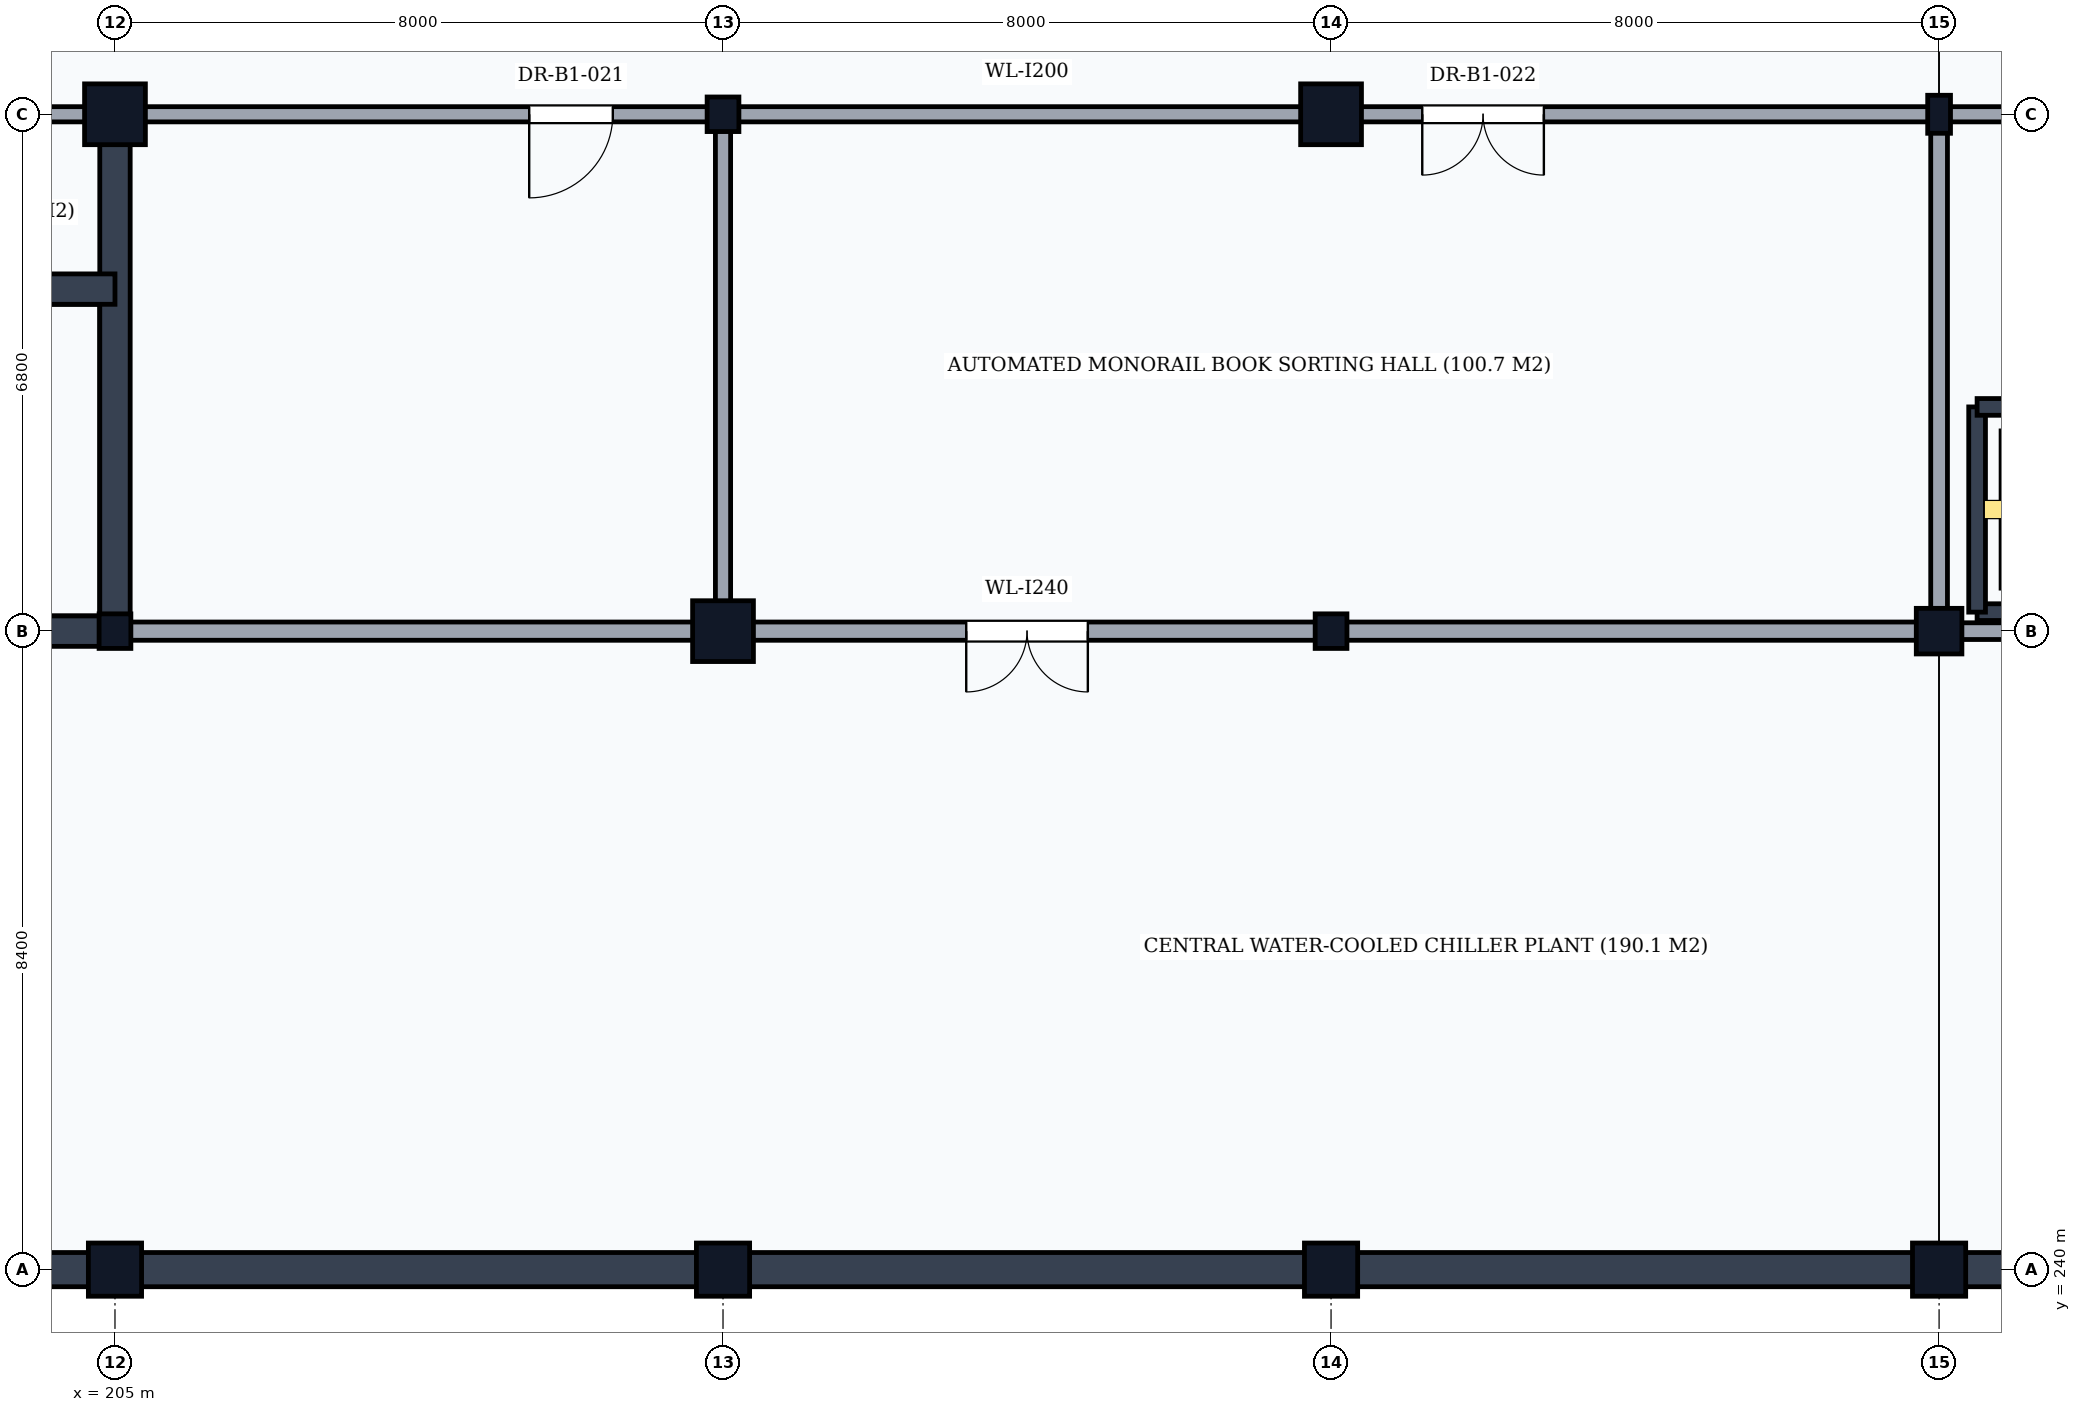
"""IFC4 building model, lengths in metres.
Left out: names, types, materials, properties, quantities, classifications, styles, units other than length and angle.
Written with IfcOpenShell. Run it as: python <this file> out.ifc"""

import sys

from ifc_helpers import new_model, si_unit, direction, frame, frame_2d, origin, origin_2d, place, context, subcontext, project, spatial, rectangle, i_section, extrude, element, fill, save


model = new_model("IFC4")
c1 = context("Model", 3, precision=1e-05, world=origin(), true_north=direction((0.0, 1.0)))
c2 = subcontext(c1, "Body", "Model", "MODEL_VIEW")
j1 = project(units=[si_unit("LENGTHUNIT", "METRE"), si_unit("PLANEANGLEUNIT", "RADIAN")], contexts=[c1])
p1 = place(None, origin())
s1 = spatial("IfcSite", under=j1, at=p1, CompositionType="ELEMENT")
p2 = place(p1, origin())
s2 = spatial("IfcBuilding", under=s1, at=p2, CompositionType="ELEMENT")
p3 = place(p2, frame((0.0, 0.0, -4.8)))
s3 = spatial("IfcBuildingStorey", under=s2, at=p3, CompositionType="ELEMENT", Elevation=-4.8)
p4 = place(p3, frame((205.0, 240.0, 0.0), z_axis=(0.0, 0.0, 1.0), x_axis=(1.0, 0.0, 0.0)))
e1 = element("IfcColumn", 1, at=p4, inside=s3, PredefinedType="COLUMN", context=c2, shape_type="SweptSolid", body=[
    extrude(rectangle(XDim=0.7, YDim=0.7, at=origin_2d()), origin(), (0.0, 0.0, 1.0), 4.8),
])
p5 = place(p3, frame((205.0, 248.4, 0.0), z_axis=(0.0, 0.0, 1.0), x_axis=(1.0, 0.0, 0.0)))
e2 = element("IfcColumn", 2, at=p5, inside=s3, PredefinedType="COLUMN", context=c2, shape_type="SweptSolid", body=[
    extrude(i_section(OverallWidth=0.418, OverallDepth=0.455, WebThickness=0.042, FlangeThickness=0.068, FilletRadius=0.015, at=origin_2d()), origin(), (0.0, 0.0, 1.0), 4.8),
])
p6 = place(p3, frame((205.0, 255.2, 0.0), z_axis=(0.0, 0.0, 1.0), x_axis=(1.0, 0.0, 0.0)))
e3 = element("IfcColumn", 3, at=p6, inside=s3, PredefinedType="COLUMN", context=c2, shape_type="SweptSolid", body=[
    extrude(rectangle(XDim=0.8, YDim=0.8, at=origin_2d()), origin(), (0.0, 0.0, 1.0), 4.8),
])
p7 = place(p3, frame((213.0, 240.0, 0.0), z_axis=(0.0, 0.0, 1.0), x_axis=(1.0, 0.0, 0.0)))
e4 = element("IfcColumn", 4, at=p7, inside=s3, PredefinedType="COLUMN", context=c2, shape_type="SweptSolid", body=[
    extrude(rectangle(XDim=0.7, YDim=0.7, at=origin_2d()), origin(), (0.0, 0.0, 1.0), 4.8),
])
p8 = place(p3, frame((213.0, 248.4, 0.0), z_axis=(0.0, 0.0, 1.0), x_axis=(1.0, 0.0, 0.0)))
e5 = element("IfcColumn", 5, at=p8, inside=s3, PredefinedType="COLUMN", context=c2, shape_type="SweptSolid", body=[
    extrude(rectangle(XDim=0.8, YDim=0.8, at=origin_2d()), origin(), (0.0, 0.0, 1.0), 4.8),
])
p9 = place(p3, frame((213.0, 255.2, 0.0), z_axis=(0.0, 0.0, 1.0), x_axis=(1.0, 0.0, 0.0)))
e6 = element("IfcColumn", 6, at=p9, inside=s3, PredefinedType="COLUMN", context=c2, shape_type="SweptSolid", body=[
    extrude(i_section(OverallWidth=0.418, OverallDepth=0.455, WebThickness=0.042, FlangeThickness=0.068, FilletRadius=0.015, at=origin_2d()), origin(), (0.0, 0.0, 1.0), 4.8),
])
p10 = place(p3, frame((221.0, 240.0, 0.0), z_axis=(0.0, 0.0, 1.0), x_axis=(1.0, 0.0, 0.0)))
e7 = element("IfcColumn", 7, at=p10, inside=s3, PredefinedType="COLUMN", context=c2, shape_type="SweptSolid", body=[
    extrude(rectangle(XDim=0.7, YDim=0.7, at=origin_2d()), origin(), (0.0, 0.0, 1.0), 4.8),
])
p11 = place(p3, frame((221.0, 248.4, 0.0), z_axis=(0.0, 0.0, 1.0), x_axis=(1.0, 0.0, 0.0)))
e8 = element("IfcColumn", 8, at=p11, inside=s3, PredefinedType="COLUMN", context=c2, shape_type="SweptSolid", body=[
    extrude(i_section(OverallWidth=0.418, OverallDepth=0.455, WebThickness=0.042, FlangeThickness=0.068, FilletRadius=0.015, at=origin_2d()), origin(), (0.0, 0.0, 1.0), 4.8),
])
p12 = place(p3, frame((221.0, 255.2, 0.0), z_axis=(0.0, 0.0, 1.0), x_axis=(1.0, 0.0, 0.0)))
e9 = element("IfcColumn", 9, at=p12, inside=s3, PredefinedType="COLUMN", context=c2, shape_type="SweptSolid", body=[
    extrude(rectangle(XDim=0.8, YDim=0.8, at=origin_2d()), origin(), (0.0, 0.0, 1.0), 4.8),
])
p13 = place(p3, frame((229.0, 240.0, 0.0), z_axis=(0.0, 0.0, 1.0), x_axis=(1.0, 0.0, 0.0)))
e10 = element("IfcColumn", 10, at=p13, inside=s3, PredefinedType="COLUMN", context=c2, shape_type="SweptSolid", body=[
    extrude(rectangle(XDim=0.7, YDim=0.7, at=origin_2d()), origin(), (0.0, 0.0, 1.0), 4.8),
])
p14 = place(p3, frame((229.0, 248.4, 0.0), z_axis=(0.0, 0.0, 1.0), x_axis=(1.0, 0.0, 0.0)))
e11 = element("IfcColumn", 11, at=p14, inside=s3, PredefinedType="COLUMN", context=c2, shape_type="SweptSolid", body=[
    extrude(rectangle(XDim=0.6, YDim=0.6, at=origin_2d()), origin(), (0.0, 0.0, 1.0), 4.8),
])
p15 = place(p3, frame((229.0, 255.2, 0.0), z_axis=(0.0, 0.0, 1.0), x_axis=(1.0, 0.0, 0.0)))
e12 = element("IfcColumn", 12, at=p15, inside=s3, PredefinedType="COLUMN", context=c2, shape_type="SweptSolid", body=[
    extrude(i_section(OverallWidth=0.3, OverallDepth=0.5, WebThickness=0.014, FlangeThickness=0.028, FilletRadius=0.027, at=origin_2d()), origin(), (0.0, 0.0, 1.0), 4.8),
])
for number, where, z_axis, x_axis in (
    (13, (197.0, 240.0, 0.0), (0.0, 0.0, 1.0), (1.0, 0.0, 0.0)),
    (14, (205.0, 240.0, 0.0), (0.0, 0.0, 1.0), (1.0, 0.0, 0.0)),
    (15, (213.0, 240.0, 0.0), (0.0, 0.0, 1.0), (1.0, 0.0, 0.0)),
    (16, (221.0, 240.0, 0.0), (0.0, 0.0, 1.0), (1.0, 0.0, 0.0)),
    (17, (229.0, 240.0, 0.0), (0.0, 0.0, 1.0), (1.0, 0.0, 0.0)),
):
    element("IfcWall", number, at=place(p3, frame(where, z_axis=z_axis, x_axis=x_axis)), inside=s3, PredefinedType="SHEAR", context=c2, shape_type="SweptSolid", body=[
        extrude(rectangle(XDim=8.0, YDim=0.45, at=frame_2d((4.0, 0.0))), origin(), (0.0, 0.0, 1.0), 4.51),
    ])
p16 = place(p3, frame((197.0, 248.4, 0.0), z_axis=(0.0, 0.0, 1.0), x_axis=(1.0, 0.0, 0.0)))
e18 = element("IfcWall", 18, at=p16, inside=s3, PredefinedType="SHEAR", context=c2, shape_type="SweptSolid", body=[
    extrude(rectangle(XDim=8.0, YDim=0.4, at=frame_2d((4.0, 0.0))), origin(), (0.0, 0.0, 1.0), 4.51),
])
p17 = place(p3, frame((205.0, 248.4, 0.0), z_axis=(0.0, 0.0, 1.0), x_axis=(0.0, 1.0, 0.0)))
e19 = element("IfcWall", 19, at=p17, inside=s3, PredefinedType="SHEAR", context=c2, shape_type="SweptSolid", body=[
    extrude(rectangle(XDim=6.8, YDim=0.4, at=frame_2d((3.4, 0.0))), origin(), (0.0, 0.0, 1.0), 4.51),
])
p18 = place(p3, frame((197.0, 252.9, 0.0), z_axis=(0.0, 0.0, 1.0), x_axis=(1.0, 0.0, 0.0)))
e20 = element("IfcWall", 20, at=p18, inside=s3, PredefinedType="SHEAR", context=c2, shape_type="SweptSolid", body=[
    extrude(rectangle(XDim=8.0, YDim=0.4, at=frame_2d((4.0, 0.0))), origin(), (0.0, 0.0, 1.0), 4.51),
])
p19 = place(p18, frame((0.3, 0.0, 0.0)))
e21 = element("IfcOpeningElement", 21, at=p19, cuts=e20, PredefinedType="OPENING", context=c2, shape_type="SweptSolid", body=[
    extrude(rectangle(XDim=1.15, YDim=2.15, at=frame_2d((0.575, 1.075))), frame((0.0, 0.215, 0.0), z_axis=(0.0, -1.0, 0.0), x_axis=(1.0, 0.0, 0.0)), (0.0, 0.0, 1.0), 0.43),
])
p20 = place(p3, frame((197.0, 255.2, 0.0), z_axis=(0.0, 0.0, 1.0), x_axis=(1.0, 0.0, 0.0)))
e22 = element("IfcWall", 22, at=p20, inside=s3, PredefinedType="PARTITIONING", context=c2, shape_type="SweptSolid", body=[
    extrude(rectangle(XDim=8.0, YDim=0.2, at=frame_2d((4.0, 0.0))), origin(), (0.0, 0.0, 1.0), 3.858),
])
p21 = place(p20, frame((3.275, 0.0, 0.0)))
e23 = element("IfcOpeningElement", 23, at=p21, cuts=e22, PredefinedType="OPENING", context=c2, shape_type="SweptSolid", body=[
    extrude(rectangle(XDim=1.45, YDim=2.2, at=frame_2d((0.725, 1.1))), frame((0.0, 0.115, 0.0), z_axis=(0.0, -1.0, 0.0), x_axis=(1.0, 0.0, 0.0)), (0.0, 0.0, 1.0), 0.23),
])
p22 = place(p3, frame((229.5, 248.65, 0.0), z_axis=(0.0, 0.0, 1.0), x_axis=(1.0, 0.0, 0.0)))
e24 = element("IfcWall", 24, at=p22, inside=s3, PredefinedType="SHEAR", context=c2, shape_type="SweptSolid", body=[
    extrude(rectangle(XDim=2.2, YDim=0.22, at=frame_2d((1.1, 0.0))), origin(), (0.0, 0.0, 1.0), 4.51),
])
p23 = place(p3, frame((229.5, 248.65, 0.0), z_axis=(0.0, 0.0, 1.0), x_axis=(0.0, 1.0, 0.0)))
e25 = element("IfcWall", 25, at=p23, inside=s3, PredefinedType="SHEAR", context=c2, shape_type="SweptSolid", body=[
    extrude(rectangle(XDim=2.7, YDim=0.22, at=frame_2d((1.35, 0.0))), origin(), (0.0, 0.0, 1.0), 4.51),
])
p24 = place(p3, frame((229.5, 251.35, 0.0), z_axis=(0.0, 0.0, 1.0), x_axis=(1.0, 0.0, 0.0)))
e26 = element("IfcWall", 26, at=p24, inside=s3, PredefinedType="SHEAR", context=c2, shape_type="SweptSolid", body=[
    extrude(rectangle(XDim=2.2, YDim=0.22, at=frame_2d((1.1, 0.0))), origin(), (0.0, 0.0, 1.0), 4.51),
])
p25 = place(p24, frame((0.5, 0.0, 0.0)))
e27 = element("IfcOpeningElement", 27, at=p25, cuts=e26, PredefinedType="OPENING", context=c2, shape_type="SweptSolid", body=[
    extrude(rectangle(XDim=1.2, YDim=2.2, at=frame_2d((0.6, 1.1))), frame((0.0, 0.125, 0.0), z_axis=(0.0, -1.0, 0.0), x_axis=(1.0, 0.0, 0.0)), (0.0, 0.0, 1.0), 0.25),
])
p26 = place(p3, frame((229.0, 248.4, 0.0), z_axis=(0.0, 0.0, 1.0), x_axis=(0.0, 1.0, 0.0)))
e28 = element("IfcWall", 28, at=p26, inside=s3, PredefinedType="PARTITIONING", context=c2, shape_type="SweptSolid", body=[
    extrude(rectangle(XDim=6.8, YDim=0.22, at=frame_2d((3.4, 0.0))), origin(), (0.0, 0.0, 1.0), 3.808),
])
p27 = place(p3, frame((229.0, 248.4, 0.0), z_axis=(0.0, 0.0, 1.0), x_axis=(1.0, 0.0, 0.0)))
e29 = element("IfcWall", 29, at=p27, inside=s3, PredefinedType="PARTITIONING", context=c2, shape_type="SweptSolid", body=[
    extrude(rectangle(XDim=8.0, YDim=0.22, at=frame_2d((4.0, 0.0))), origin(), (0.0, 0.0, 1.0), 3.858),
])
p28 = place(p3, frame((229.0, 255.2, 0.0), z_axis=(0.0, 0.0, 1.0), x_axis=(1.0, 0.0, 0.0)))
e30 = element("IfcWall", 30, at=p28, inside=s3, PredefinedType="PARTITIONING", context=c2, shape_type="SweptSolid", body=[
    extrude(rectangle(XDim=8.0, YDim=0.2, at=frame_2d((4.0, 0.0))), origin(), (0.0, 0.0, 1.0), 3.858),
])
p29 = place(p28, frame((3.1, 0.0, 0.0)))
e31 = element("IfcOpeningElement", 31, at=p29, cuts=e30, PredefinedType="OPENING", context=c2, shape_type="SweptSolid", body=[
    extrude(rectangle(XDim=1.8, YDim=2.4, at=frame_2d((0.9, 1.2))), frame((0.0, 0.115, 0.0), z_axis=(0.0, -1.0, 0.0), x_axis=(1.0, 0.0, 0.0)), (0.0, 0.0, 1.0), 0.23),
])
p30 = place(p3, frame((205.0, 248.4, 0.0), z_axis=(0.0, 0.0, 1.0), x_axis=(1.0, 0.0, 0.0)))
e32 = element("IfcWall", 32, at=p30, inside=s3, PredefinedType="PARTITIONING", context=c2, shape_type="SweptSolid", body=[
    extrude(rectangle(XDim=24.0, YDim=0.24, at=frame_2d((12.0, 0.0))), origin(), (0.0, 0.0, 1.0), 3.858),
])
p31 = place(p30, frame((11.2, 0.0, 0.0)))
e33 = element("IfcOpeningElement", 33, at=p31, cuts=e32, PredefinedType="OPENING", context=c2, shape_type="SweptSolid", body=[
    extrude(rectangle(XDim=1.6, YDim=2.1, at=frame_2d((0.8, 1.05))), frame((0.0, 0.135, 0.0), z_axis=(0.0, -1.0, 0.0), x_axis=(1.0, 0.0, 0.0)), (0.0, 0.0, 1.0), 0.27),
])
p32 = place(p3, frame((205.0, 255.2, 0.0), z_axis=(0.0, 0.0, 1.0), x_axis=(1.0, 0.0, 0.0)))
e34 = element("IfcWall", 34, at=p32, inside=s3, PredefinedType="PARTITIONING", context=c2, shape_type="SweptSolid", body=[
    extrude(rectangle(XDim=24.0, YDim=0.2, at=frame_2d((12.0, 0.0))), origin(), (0.0, 0.0, 1.0), 3.858),
])
p33 = place(p32, frame((5.45, 0.0, 0.0)))
e35 = element("IfcOpeningElement", 35, at=p33, cuts=e34, PredefinedType="OPENING", context=c2, shape_type="SweptSolid", body=[
    extrude(rectangle(XDim=1.1, YDim=2.1, at=frame_2d((0.55, 1.05))), frame((0.0, 0.115, 0.0), z_axis=(0.0, -1.0, 0.0), x_axis=(1.0, 0.0, 0.0)), (0.0, 0.0, 1.0), 0.23),
])
p34 = place(p32, frame((17.2, 0.0, 0.0)))
e36 = element("IfcOpeningElement", 36, at=p34, cuts=e34, PredefinedType="OPENING", context=c2, shape_type="SweptSolid", body=[
    extrude(rectangle(XDim=1.6, YDim=2.1, at=frame_2d((0.8, 1.05))), frame((0.0, 0.115, 0.0), z_axis=(0.0, -1.0, 0.0), x_axis=(1.0, 0.0, 0.0)), (0.0, 0.0, 1.0), 0.23),
])
p35 = place(p3, frame((213.0, 248.4, 0.0), z_axis=(0.0, 0.0, 1.0), x_axis=(0.0, 1.0, 0.0)))
e37 = element("IfcWall", 37, at=p35, inside=s3, PredefinedType="PARTITIONING", context=c2, shape_type="SweptSolid", body=[
    extrude(rectangle(XDim=6.8, YDim=0.2, at=frame_2d((3.4, 0.0))), origin(), (0.0, 0.0, 1.0), 3.808),
])
p36 = place(p31, frame((1.6, 0.0, 0.0), z_axis=(0.0, 0.0, 1.0), x_axis=(-1.0, 0.0, 0.0)))
e38 = element("IfcDoor", 38, at=p36, inside=s3, OperationType="DOUBLE_DOOR_SINGLE_SWING", PredefinedType="DOOR", context=c2, shape_type="SweptSolid", body=[
    extrude(rectangle(XDim=1.6, YDim=2.1, at=frame_2d((0.8, 1.05))), frame((0.0, 0.025, 0.0), z_axis=(0.0, -1.0, 0.0), x_axis=(1.0, 0.0, 0.0)), (0.0, 0.0, 1.0), 0.05),
])
fill(e33, e38)
p37 = place(p33, frame((1.1, 0.0, 0.0), z_axis=(0.0, 0.0, 1.0), x_axis=(-1.0, 0.0, 0.0)))
e39 = element("IfcDoor", 39, at=p37, inside=s3, OperationType="SINGLE_SWING_RIGHT", PredefinedType="DOOR", context=c2, shape_type="SweptSolid", body=[
    extrude(rectangle(XDim=1.1, YDim=2.1, at=frame_2d((0.55, 1.05))), frame((0.0, 0.025, 0.0), z_axis=(0.0, -1.0, 0.0), x_axis=(1.0, 0.0, 0.0)), (0.0, 0.0, 1.0), 0.05),
])
fill(e35, e39)
p38 = place(p34, frame((1.6, 0.0, 0.0), z_axis=(0.0, 0.0, 1.0), x_axis=(-1.0, 0.0, 0.0)))
e40 = element("IfcDoor", 40, at=p38, inside=s3, OperationType="DOUBLE_DOOR_SINGLE_SWING", PredefinedType="DOOR", context=c2, shape_type="SweptSolid", body=[
    extrude(rectangle(XDim=1.6, YDim=2.1, at=frame_2d((0.8, 1.05))), frame((0.0, 0.025, 0.0), z_axis=(0.0, -1.0, 0.0), x_axis=(1.0, 0.0, 0.0)), (0.0, 0.0, 1.0), 0.05),
])
fill(e36, e40)
save(model, sys.argv[1])
